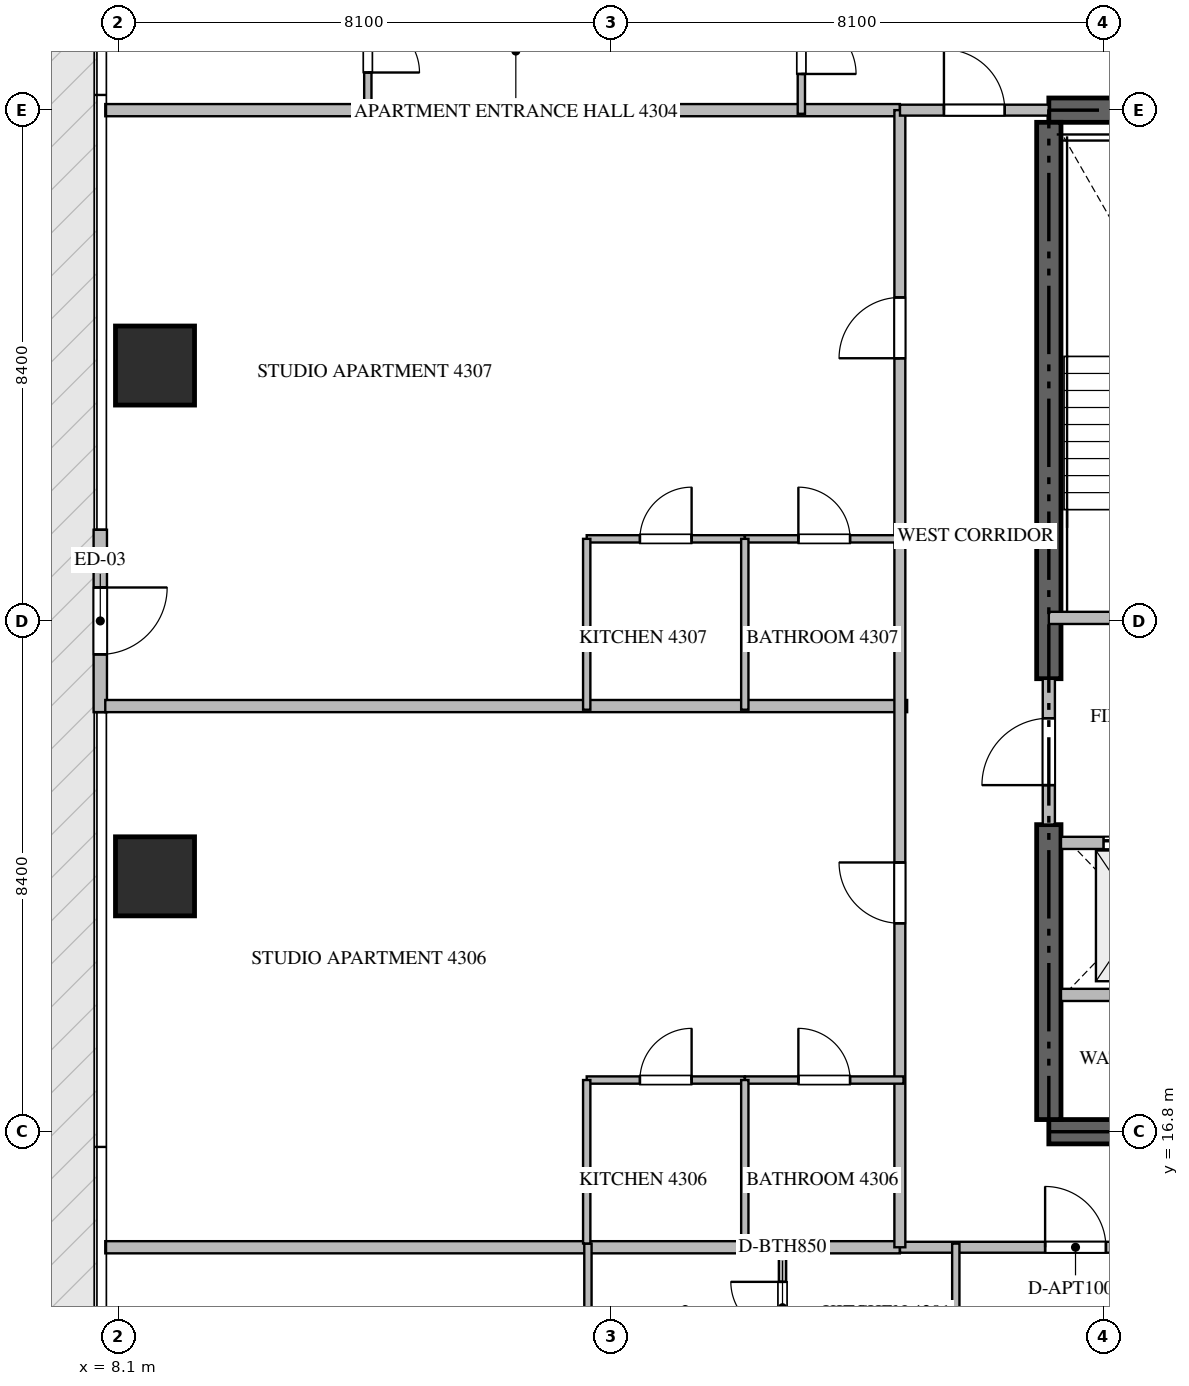
"""IFC4 building model, lengths in metres.
Left out: names, types, materials, properties, quantities, classifications, styles, units other than length and angle.
Written with IfcOpenShell. Run it as: python <this file> out.ifc"""

import sys

from ifc_helpers import new_model, si_unit, direction, frame, frame_2d, origin, origin_2d, place, context, subcontext, project, spatial, rectangle, extrude, source, transform, mapped, element, fill, save


model = new_model("IFC4")
c1 = context("Model", 3, precision=1e-05, world=origin(), true_north=direction((0.0, 1.0)))
c2 = subcontext(c1, "Body", "Model", "MODEL_VIEW")
j1 = project(units=[si_unit("LENGTHUNIT", "METRE"), si_unit("PLANEANGLEUNIT", "RADIAN")], contexts=[c1])
p1 = place(None, origin())
s1 = spatial("IfcSite", under=j1, at=p1, CompositionType="ELEMENT")
p2 = place(p1, origin())
s2 = spatial("IfcBuilding", under=s1, at=p2, CompositionType="ELEMENT")
p3 = place(p2, frame((0.0, 0.0, 172.65)))
s3 = spatial("IfcBuildingStorey", under=s2, at=p3, CompositionType="ELEMENT", Elevation=172.65)
for number, where, z_axis, x_axis in (
    (1, (23.4, 16.8, -0.26), (0.0, 0.0, 1.0), (1.0, 0.0, 0.0)),
    (2, (41.4, 33.6, -0.26), (0.0, 0.0, 1.0), (-1.0, 0.0, 0.0)),
):
    element("IfcWall", number, at=place(p3, frame(where, z_axis=z_axis, x_axis=x_axis)), inside=s3, PredefinedType="SHEAR", context=c2, shape_type="SweptSolid", body=[
        extrude(rectangle(XDim=18.0, YDim=0.4, at=frame_2d((9.0, 0.0))), origin(), (0.0, 0.0, 1.0), 3.748),
    ])
p4 = place(p3, frame((23.4, 17.0, -0.26), z_axis=(0.0, 0.0, 1.0), x_axis=(0.0, 1.0, 0.0)))
e3 = element("IfcWall", 3, at=p4, inside=s3, PredefinedType="SHEAR", context=c2, shape_type="SweptSolid", body=[
    extrude(rectangle(XDim=4.85, YDim=0.4, at=frame_2d((2.425, 0.0))), origin(), (0.0, 0.0, 1.0), 3.748),
])
p5 = place(p3, frame((23.4, 24.25, -0.26), z_axis=(0.0, 0.0, 1.0), x_axis=(0.0, 1.0, 0.0)))
e4 = element("IfcWall", 4, at=p5, inside=s3, PredefinedType="SHEAR", context=c2, shape_type="SweptSolid", body=[
    extrude(rectangle(XDim=9.15, YDim=0.4, at=frame_2d((4.575, 0.0))), origin(), (0.0, 0.0, 1.0), 3.748),
])
m1 = source(origin(), c2, "Body", "SweptSolid", [
    extrude(rectangle(XDim=1.3, YDim=1.3, at=origin_2d()), origin(), (0.0, 0.0, 1.0), 3.75),
])
for number, where, z_axis, x_axis in (
    (5, (8.7, 21.0, -0.26), (0.0, 0.0, 1.0), (1.0, 0.0, 0.0)),
    (6, (8.7, 29.4, -0.26), (0.0, 0.0, 1.0), (1.0, 0.0, 0.0)),
):
    element("IfcColumn", number, at=place(p3, frame(where, z_axis=z_axis, x_axis=x_axis)), inside=s3, PredefinedType="COLUMN", context=c2, shape_type="MappedRepresentation", body=[
        mapped(m1, transform((0.0, 0.0, 0.0), scale=1.0)),
    ])
p6 = place(p3, frame((7.8, 26.7, 0.0), z_axis=(0.0, 0.0, 1.0), x_axis=(0.0, -1.0, 0.0)))
e7 = element("IfcWall", 7, at=p6, inside=s3, PredefinedType="ELEMENTEDWALL", context=c2, shape_type="SweptSolid", body=[
    extrude(rectangle(XDim=3.0, YDim=0.22, at=frame_2d((1.5, 0.0))), origin(), (0.0, 0.0, 1.0), 3.475),
])
p7 = place(p6, frame((0.95, 0.0, 0.0)))
e8 = element("IfcOpeningElement", 8, at=p7, cuts=e7, PredefinedType="OPENING", context=c2, shape_type="SweptSolid", body=[
    extrude(rectangle(XDim=1.1, YDim=2.2, at=frame_2d((0.55, 1.1))), frame((0.0, 0.12, 0.0), z_axis=(0.0, -1.0, 0.0), x_axis=(1.0, 0.0, 0.0)), (0.0, 0.0, 1.0), 0.24),
])
p8 = place(p3, frame((23.4, 25.25, 0.0), z_axis=(0.0, 0.0, 1.0), x_axis=(1.0, 0.0, 0.0)))
e9 = element("IfcWall", 9, at=p8, inside=s3, PredefinedType="STANDARD", context=c2, shape_type="SweptSolid", body=[
    extrude(rectangle(XDim=4.45, YDim=0.2, at=frame_2d((2.225, 0.0))), origin(), (0.0, 0.0, 1.0), 3.49),
])
p9 = place(p8, frame((1.65, 0.0, 0.0)))
e10 = element("IfcOpeningElement", 10, at=p9, cuts=e9, PredefinedType="OPENING", context=c2, shape_type="SweptSolid", body=[
    extrude(rectangle(XDim=1.1, YDim=2.15, at=frame_2d((0.55, 1.075))), frame((0.0, 0.11, 0.0), z_axis=(0.0, -1.0, 0.0), x_axis=(1.0, 0.0, 0.0)), (0.0, 0.0, 1.0), 0.22),
])
p10 = place(p3, frame((23.6, 21.55, 0.0), z_axis=(0.0, 0.0, 1.0), x_axis=(1.0, 0.0, 0.0)))
e11 = element("IfcWall", 11, at=p10, inside=s3, PredefinedType="STANDARD", context=c2, shape_type="SweptSolid", body=[
    extrude(rectangle(XDim=2.45, YDim=0.2, at=frame_2d((1.225, 0.0))), origin(), (0.0, 0.0, 1.0), 3.49),
])
p11 = place(p10, frame((0.7, 0.0, 0.0)))
e12 = element("IfcOpeningElement", 12, at=p11, cuts=e11, PredefinedType="OPENING", context=c2, shape_type="SweptSolid", body=[
    extrude(rectangle(XDim=1.2, YDim=2.2, at=frame_2d((0.6, 1.1))), frame((0.0, 0.11, 0.0), z_axis=(0.0, -1.0, 0.0), x_axis=(1.0, 0.0, 0.0)), (0.0, 0.0, 1.0), 0.22),
])
p12 = place(p3, frame((23.6, 19.05, 0.0), z_axis=(0.0, 0.0, 1.0), x_axis=(1.0, 0.0, 0.0)))
e13 = element("IfcWall", 13, at=p12, inside=s3, PredefinedType="STANDARD", context=c2, shape_type="SweptSolid", body=[
    extrude(rectangle(XDim=2.45, YDim=0.2, at=frame_2d((1.225, 0.0))), origin(), (0.0, 0.0, 1.0), 3.49),
])
p13 = place(p3, frame((23.4, 21.852, 0.0), z_axis=(0.0, 0.0, 1.0), x_axis=(0.0, 1.0, 0.0)))
e14 = element("IfcWall", 14, at=p13, inside=s3, PredefinedType="STANDARD", context=c2, shape_type="SweptSolid", body=[
    extrude(rectangle(XDim=2.396, YDim=0.2, at=frame_2d((1.198, 0.0))), origin(), (0.0, 0.0, 1.0), 3.49),
])
p14 = place(p13, frame((0.648, 0.0, 0.0)))
e15 = element("IfcOpeningElement", 15, at=p14, cuts=e14, PredefinedType="OPENING", context=c2, shape_type="SweptSolid", body=[
    extrude(rectangle(XDim=1.1, YDim=2.15, at=frame_2d((0.55, 1.075))), frame((0.0, 0.11, 0.0), z_axis=(0.0, -1.0, 0.0), x_axis=(1.0, 0.0, 0.0)), (0.0, 0.0, 1.0), 0.22),
])
p15 = place(p3, frame((7.882, 23.8, 0.0), z_axis=(0.0, 0.0, 1.0), x_axis=(1.0, 0.0, 0.0)))
e16 = element("IfcWall", 16, at=p15, inside=s3, PredefinedType="PARTITIONING", context=c2, shape_type="SweptSolid", body=[
    extrude(rectangle(XDim=13.188, YDim=0.2, at=frame_2d((6.594, 0.0))), origin(), (0.0, 0.0, 1.0), 3.49),
])
for number, where, z_axis, x_axis in (
    (17, (7.882, 14.9, 0.0), (0.0, 0.0, 1.0), (1.0, 0.0, 0.0)),
    (18, (7.882, 33.6, 0.0), (0.0, 0.0, 1.0), (1.0, 0.0, 0.0)),
):
    element("IfcWall", number, at=place(p3, frame(where, z_axis=z_axis, x_axis=x_axis)), inside=s3, PredefinedType="PARTITIONING", context=c2, shape_type="SweptSolid", body=[
        extrude(rectangle(XDim=13.068, YDim=0.2, at=frame_2d((6.534, 0.0))), origin(), (0.0, 0.0, 1.0), 3.49),
    ])
p16 = place(p3, frame((20.952, 14.9, 0.0), z_axis=(0.0, 0.0, 1.0), x_axis=(1.0, 0.0, 0.0)))
e19 = element("IfcWall", 19, at=p16, inside=s3, PredefinedType="PARTITIONING", context=c2, shape_type="SweptSolid", body=[
    extrude(rectangle(XDim=22.896, YDim=0.18, at=frame_2d((11.448, 0.0))), origin(), (0.0, 0.0, 1.0), 3.49),
])
p17 = place(p16, frame((2.387, 0.0, 0.0)))
e20 = element("IfcOpeningElement", 20, at=p17, cuts=e19, PredefinedType="OPENING", context=c2, shape_type="SweptSolid", body=[
    extrude(rectangle(XDim=1.0, YDim=2.15, at=frame_2d((0.5, 1.075))), frame((0.0, 0.1, 0.0), z_axis=(0.0, -1.0, 0.0), x_axis=(1.0, 0.0, 0.0)), (0.0, 0.0, 1.0), 0.2),
])
p18 = place(p16, frame((6.591, 0.0, 0.0)))
e21 = element("IfcOpeningElement", 21, at=p18, cuts=e19, PredefinedType="OPENING", context=c2, shape_type="SweptSolid", body=[
    extrude(rectangle(XDim=1.0, YDim=2.15, at=frame_2d((0.5, 1.075))), frame((0.0, 0.1, 0.0), z_axis=(0.0, -1.0, 0.0), x_axis=(1.0, 0.0, 0.0)), (0.0, 0.0, 1.0), 0.2),
])
p19 = place(p16, frame((16.51, 0.0, 0.0)))
e22 = element("IfcOpeningElement", 22, at=p19, cuts=e19, PredefinedType="OPENING", context=c2, shape_type="SweptSolid", body=[
    extrude(rectangle(XDim=1.0, YDim=2.15, at=frame_2d((0.5, 1.075))), frame((0.0, 0.1, 0.0), z_axis=(0.0, -1.0, 0.0), x_axis=(1.0, 0.0, 0.0)), (0.0, 0.0, 1.0), 0.2),
])
p20 = place(p3, frame((20.95, 14.9, 0.0), z_axis=(0.0, 0.0, 1.0), x_axis=(0.0, 1.0, 0.0)))
e23 = element("IfcWall", 23, at=p20, inside=s3, PredefinedType="PARTITIONING", context=c2, shape_type="SweptSolid", body=[
    extrude(rectangle(XDim=18.7, YDim=0.18, at=frame_2d((9.35, 0.0))), origin(), (0.0, 0.0, 1.0), 3.49),
])
p21 = place(p20, frame((5.328, 0.0, 0.0)))
e24 = element("IfcOpeningElement", 24, at=p21, cuts=e23, PredefinedType="OPENING", context=c2, shape_type="SweptSolid", body=[
    extrude(rectangle(XDim=1.0, YDim=2.15, at=frame_2d((0.5, 1.075))), frame((0.0, 0.1, 0.0), z_axis=(0.0, -1.0, 0.0), x_axis=(1.0, 0.0, 0.0)), (0.0, 0.0, 1.0), 0.2),
])
p22 = place(p20, frame((14.62, 0.0, 0.0)))
e25 = element("IfcOpeningElement", 25, at=p22, cuts=e23, PredefinedType="OPENING", context=c2, shape_type="SweptSolid", body=[
    extrude(rectangle(XDim=1.0, YDim=2.15, at=frame_2d((0.5, 1.075))), frame((0.0, 0.1, 0.0), z_axis=(0.0, -1.0, 0.0), x_axis=(1.0, 0.0, 0.0)), (0.0, 0.0, 1.0), 0.2),
])
p23 = place(p3, frame((20.952, 33.6, 0.0), z_axis=(0.0, 0.0, 1.0), x_axis=(1.0, 0.0, 0.0)))
e26 = element("IfcWall", 26, at=p23, inside=s3, PredefinedType="PARTITIONING", context=c2, shape_type="SweptSolid", body=[
    extrude(rectangle(XDim=2.446, YDim=0.18, at=frame_2d((1.223, 0.0))), origin(), (0.0, 0.0, 1.0), 3.49),
])
p24 = place(p23, frame((0.723, 0.0, 0.0)))
e27 = element("IfcOpeningElement", 27, at=p24, cuts=e26, PredefinedType="OPENING", context=c2, shape_type="SweptSolid", body=[
    extrude(rectangle(XDim=1.0, YDim=2.15, at=frame_2d((0.5, 1.075))), frame((0.0, 0.1, 0.0), z_axis=(0.0, -1.0, 0.0), x_axis=(1.0, 0.0, 0.0)), (0.0, 0.0, 1.0), 0.2),
])
p25 = place(p3, frame((21.87, 12.15, 0.0), z_axis=(0.0, 0.0, 1.0), x_axis=(0.0, 1.0, 0.0)))
e28 = element("IfcWall", 28, at=p25, inside=s3, PredefinedType="PARTITIONING", context=c2, shape_type="SweptSolid", body=[
    extrude(rectangle(XDim=2.81, YDim=0.12, at=frame_2d((1.405, 0.0))), origin(), (0.0, 0.0, 1.0), 3.49),
])
p26 = place(p3, frame((15.82, 12.85, 0.0), z_axis=(0.0, 0.0, 1.0), x_axis=(0.0, 1.0, 0.0)))
e29 = element("IfcWall", 29, at=p26, inside=s3, PredefinedType="PARTITIONING", context=c2, shape_type="SweptSolid", body=[
    extrude(rectangle(XDim=2.11, YDim=0.12, at=frame_2d((1.055, 0.0))), origin(), (0.0, 0.0, 1.0), 3.49),
])
p27 = place(p3, frame((19.02, 12.852, 0.0), z_axis=(0.0, 0.0, 1.0), x_axis=(0.0, 1.0, 0.0)))
e30 = element("IfcWall", 30, at=p27, inside=s3, PredefinedType="PARTITIONING", context=c2, shape_type="SweptSolid", body=[
    extrude(rectangle(XDim=2.108, YDim=0.12, at=frame_2d((1.054, 0.0))), origin(), (0.0, 0.0, 1.0), 3.49),
])
p28 = place(p27, frame((0.629, 0.0, 0.0)))
e31 = element("IfcOpeningElement", 31, at=p28, cuts=e30, PredefinedType="OPENING", context=c2, shape_type="SweptSolid", body=[
    extrude(rectangle(XDim=0.85, YDim=2.1, at=frame_2d((0.425, 1.05))), frame((0.0, 0.07, 0.0), z_axis=(0.0, -1.0, 0.0), x_axis=(1.0, 0.0, 0.0)), (0.0, 0.0, 1.0), 0.14),
])
p29 = place(p3, frame((19.33, 35.75, 0.0), z_axis=(0.0, 0.0, 1.0), x_axis=(0.0, -1.0, 0.0)))
e32 = element("IfcWall", 32, at=p29, inside=s3, PredefinedType="PARTITIONING", context=c2, shape_type="SweptSolid", body=[
    extrude(rectangle(XDim=2.21, YDim=0.12, at=frame_2d((1.105, 0.0))), origin(), (0.0, 0.0, 1.0), 3.49),
])
p30 = place(p29, frame((0.655, 0.0, 0.0)))
e33 = element("IfcOpeningElement", 33, at=p30, cuts=e32, PredefinedType="OPENING", context=c2, shape_type="SweptSolid", body=[
    extrude(rectangle(XDim=0.9, YDim=2.1, at=frame_2d((0.45, 1.05))), frame((0.0, 0.07, 0.0), z_axis=(0.0, -1.0, 0.0), x_axis=(1.0, 0.0, 0.0)), (0.0, 0.0, 1.0), 0.14),
])
p31 = place(p3, frame((12.2, 35.748, 0.0), z_axis=(0.0, 0.0, 1.0), x_axis=(0.0, -1.0, 0.0)))
e34 = element("IfcWall", 34, at=p31, inside=s3, PredefinedType="PARTITIONING", context=c2, shape_type="SweptSolid", body=[
    extrude(rectangle(XDim=2.208, YDim=0.12, at=frame_2d((1.104, 0.0))), origin(), (0.0, 0.0, 1.0), 3.49),
])
p32 = place(p31, frame((0.679, 0.0, 0.0)))
e35 = element("IfcOpeningElement", 35, at=p32, cuts=e34, PredefinedType="OPENING", context=c2, shape_type="SweptSolid", body=[
    extrude(rectangle(XDim=0.85, YDim=2.1, at=frame_2d((0.425, 1.05))), frame((0.0, 0.07, 0.0), z_axis=(0.0, -1.0, 0.0), x_axis=(1.0, 0.0, 0.0)), (0.0, 0.0, 1.0), 0.14),
])
p33 = place(p3, frame((15.8, 17.65, 0.0), z_axis=(0.0, 0.0, 1.0), x_axis=(1.0, 0.0, 0.0)))
e36 = element("IfcWall", 36, at=p33, inside=s3, PredefinedType="PARTITIONING", context=c2, shape_type="SweptSolid", body=[
    extrude(rectangle(XDim=2.6, YDim=0.12, at=frame_2d((1.3, 0.0))), origin(), (0.0, 0.0, 1.0), 3.49),
])
p34 = place(p33, frame((0.875, 0.0, 0.0)))
e37 = element("IfcOpeningElement", 37, at=p34, cuts=e36, PredefinedType="OPENING", context=c2, shape_type="SweptSolid", body=[
    extrude(rectangle(XDim=0.85, YDim=2.1, at=frame_2d((0.425, 1.05))), frame((0.0, 0.07, 0.0), z_axis=(0.0, -1.0, 0.0), x_axis=(1.0, 0.0, 0.0)), (0.0, 0.0, 1.0), 0.14),
])
p35 = place(p3, frame((18.402, 17.65, 0.0), z_axis=(0.0, 0.0, 1.0), x_axis=(1.0, 0.0, 0.0)))
e38 = element("IfcWall", 38, at=p35, inside=s3, PredefinedType="PARTITIONING", context=c2, shape_type="SweptSolid", body=[
    extrude(rectangle(XDim=2.608, YDim=0.12, at=frame_2d((1.304, 0.0))), origin(), (0.0, 0.0, 1.0), 3.49),
])
p36 = place(p35, frame((0.879, 0.0, 0.0)))
e39 = element("IfcOpeningElement", 39, at=p36, cuts=e38, PredefinedType="OPENING", context=c2, shape_type="SweptSolid", body=[
    extrude(rectangle(XDim=0.85, YDim=2.1, at=frame_2d((0.425, 1.05))), frame((0.0, 0.07, 0.0), z_axis=(0.0, -1.0, 0.0), x_axis=(1.0, 0.0, 0.0)), (0.0, 0.0, 1.0), 0.14),
])
p37 = place(p3, frame((18.4, 14.84, 0.0), z_axis=(0.0, 0.0, 1.0), x_axis=(0.0, 1.0, 0.0)))
e40 = element("IfcWall", 40, at=p37, inside=s3, PredefinedType="PARTITIONING", context=c2, shape_type="SweptSolid", body=[
    extrude(rectangle(XDim=2.81, YDim=0.12, at=frame_2d((1.405, 0.0))), origin(), (0.0, 0.0, 1.0), 3.49),
])
p38 = place(p3, frame((15.8, 14.962, 0.0), z_axis=(0.0, 0.0, 1.0), x_axis=(0.0, 1.0, 0.0)))
e41 = element("IfcWall", 41, at=p38, inside=s3, PredefinedType="PARTITIONING", context=c2, shape_type="SweptSolid", body=[
    extrude(rectangle(XDim=2.688, YDim=0.12, at=frame_2d((1.344, 0.0))), origin(), (0.0, 0.0, 1.0), 3.49),
])
p39 = place(p3, frame((15.8, 26.55, 0.0), z_axis=(0.0, 0.0, 1.0), x_axis=(1.0, 0.0, 0.0)))
e42 = element("IfcWall", 42, at=p39, inside=s3, PredefinedType="PARTITIONING", context=c2, shape_type="SweptSolid", body=[
    extrude(rectangle(XDim=2.6, YDim=0.12, at=frame_2d((1.3, 0.0))), origin(), (0.0, 0.0, 1.0), 3.49),
])
p40 = place(p39, frame((0.875, 0.0, 0.0)))
e43 = element("IfcOpeningElement", 43, at=p40, cuts=e42, PredefinedType="OPENING", context=c2, shape_type="SweptSolid", body=[
    extrude(rectangle(XDim=0.85, YDim=2.1, at=frame_2d((0.425, 1.05))), frame((0.0, 0.07, 0.0), z_axis=(0.0, -1.0, 0.0), x_axis=(1.0, 0.0, 0.0)), (0.0, 0.0, 1.0), 0.14),
])
p41 = place(p3, frame((18.402, 26.55, 0.0), z_axis=(0.0, 0.0, 1.0), x_axis=(1.0, 0.0, 0.0)))
e44 = element("IfcWall", 44, at=p41, inside=s3, PredefinedType="PARTITIONING", context=c2, shape_type="SweptSolid", body=[
    extrude(rectangle(XDim=2.608, YDim=0.12, at=frame_2d((1.304, 0.0))), origin(), (0.0, 0.0, 1.0), 3.49),
])
p42 = place(p41, frame((0.879, 0.0, 0.0)))
e45 = element("IfcOpeningElement", 45, at=p42, cuts=e44, PredefinedType="OPENING", context=c2, shape_type="SweptSolid", body=[
    extrude(rectangle(XDim=0.85, YDim=2.1, at=frame_2d((0.425, 1.05))), frame((0.0, 0.07, 0.0), z_axis=(0.0, -1.0, 0.0), x_axis=(1.0, 0.0, 0.0)), (0.0, 0.0, 1.0), 0.14),
])
for number, where, z_axis, x_axis in (
    (46, (18.4, 23.74, 0.0), (0.0, 0.0, 1.0), (0.0, 1.0, 0.0)),
    (47, (15.8, 23.74, 0.0), (0.0, 0.0, 1.0), (0.0, 1.0, 0.0)),
):
    element("IfcWall", number, at=place(p3, frame(where, z_axis=z_axis, x_axis=x_axis)), inside=s3, PredefinedType="PARTITIONING", context=c2, shape_type="SweptSolid", body=[
        extrude(rectangle(XDim=2.81, YDim=0.12, at=frame_2d((1.405, 0.0))), origin(), (0.0, 0.0, 1.0), 3.49),
    ])
m2 = source(origin(), c2, "Body", "SweptSolid", [
    extrude(rectangle(XDim=1.1, YDim=2.2, at=frame_2d((0.55, 1.1))), frame((0.0, 0.025, 0.0), z_axis=(0.0, -1.0, 0.0), x_axis=(1.0, 0.0, 0.0)), (0.0, 0.0, 1.0), 0.05),
])
p43 = place(p7, origin())
e48 = element("IfcDoor", 48, at=p43, inside=s3, OperationType="SINGLE_SWING_LEFT", PredefinedType="DOOR", context=c2, shape_type="MappedRepresentation", body=[
    mapped(m2, transform((0.0, 0.0, 0.0), scale=1.0)),
])
fill(e8, e48)
m3 = source(origin(), c2, "Body", "SweptSolid", [
    extrude(rectangle(XDim=1.2, YDim=2.2, at=frame_2d((0.6, 1.1))), frame((0.0, 0.025, 0.0), z_axis=(0.0, -1.0, 0.0), x_axis=(1.0, 0.0, 0.0)), (0.0, 0.0, 1.0), 0.05),
])
p44 = place(p11, origin())
e49 = element("IfcDoor", 49, at=p44, inside=s3, OperationType="DOUBLE_DOOR_SLIDING", PredefinedType="DOOR", context=c2, shape_type="MappedRepresentation", body=[
    mapped(m3, transform((0.0, 0.0, 0.0), scale=1.0)),
])
fill(e12, e49)
m4 = source(origin(), c2, "Body", "SweptSolid", [
    extrude(rectangle(XDim=1.1, YDim=2.15, at=frame_2d((0.55, 1.075))), frame((0.0, 0.025, 0.0), z_axis=(0.0, -1.0, 0.0), x_axis=(1.0, 0.0, 0.0)), (0.0, 0.0, 1.0), 0.05),
])
p45 = place(p14, origin())
e50 = element("IfcDoor", 50, at=p45, inside=s3, OperationType="SINGLE_SWING_LEFT", PredefinedType="DOOR", context=c2, shape_type="MappedRepresentation", body=[
    mapped(m4, transform((0.0, 0.0, 0.0), scale=1.0)),
])
fill(e15, e50)
m5 = source(origin(), c2, "Body", "SweptSolid", [
    extrude(rectangle(XDim=1.0, YDim=2.15, at=frame_2d((0.5, 1.075))), frame((0.0, 0.025, 0.0), z_axis=(0.0, -1.0, 0.0), x_axis=(1.0, 0.0, 0.0)), (0.0, 0.0, 1.0), 0.05),
])
p46 = place(p17, origin())
e51 = element("IfcDoor", 51, at=p46, inside=s3, OperationType="SINGLE_SWING_LEFT", PredefinedType="DOOR", context=c2, shape_type="MappedRepresentation", body=[
    mapped(m5, transform((0.0, 0.0, 0.0), scale=1.0)),
])
fill(e20, e51)
p47 = place(p21, origin())
e52 = element("IfcDoor", 52, at=p47, inside=s3, OperationType="SINGLE_SWING_RIGHT", PredefinedType="DOOR", context=c2, shape_type="MappedRepresentation", body=[
    mapped(m5, transform((0.0, 0.0, 0.0), scale=1.0)),
])
fill(e24, e52)
p48 = place(p22, origin())
e53 = element("IfcDoor", 53, at=p48, inside=s3, OperationType="SINGLE_SWING_LEFT", PredefinedType="DOOR", context=c2, shape_type="MappedRepresentation", body=[
    mapped(m5, transform((0.0, 0.0, 0.0), scale=1.0)),
])
fill(e25, e53)
p49 = place(p24, origin())
e54 = element("IfcDoor", 54, at=p49, inside=s3, OperationType="SINGLE_SWING_LEFT", PredefinedType="DOOR", context=c2, shape_type="MappedRepresentation", body=[
    mapped(m5, transform((0.0, 0.0, 0.0), scale=1.0)),
])
fill(e27, e54)
m6 = source(origin(), c2, "Body", "SweptSolid", [
    extrude(rectangle(XDim=0.85, YDim=2.1, at=frame_2d((0.425, 1.05))), frame((0.0, 0.025, 0.0), z_axis=(0.0, -1.0, 0.0), x_axis=(1.0, 0.0, 0.0)), (0.0, 0.0, 1.0), 0.05),
])
p50 = place(p28, origin())
e55 = element("IfcDoor", 55, at=p50, inside=s3, OperationType="SINGLE_SWING_RIGHT", PredefinedType="DOOR", context=c2, shape_type="MappedRepresentation", body=[
    mapped(m6, transform((0.0, 0.0, 0.0), scale=1.0)),
])
fill(e31, e55)
m7 = source(origin(), c2, "Body", "SweptSolid", [
    extrude(rectangle(XDim=0.9, YDim=2.1, at=frame_2d((0.45, 1.05))), frame((0.0, 0.025, 0.0), z_axis=(0.0, -1.0, 0.0), x_axis=(1.0, 0.0, 0.0)), (0.0, 0.0, 1.0), 0.05),
])
p51 = place(p30, origin())
e56 = element("IfcDoor", 56, at=p51, inside=s3, OperationType="SINGLE_SWING_RIGHT", PredefinedType="DOOR", context=c2, shape_type="MappedRepresentation", body=[
    mapped(m7, transform((0.0, 0.0, 0.0), scale=1.0)),
])
fill(e33, e56)
p52 = place(p32, origin())
e57 = element("IfcDoor", 57, at=p52, inside=s3, OperationType="SINGLE_SWING_RIGHT", PredefinedType="DOOR", context=c2, shape_type="MappedRepresentation", body=[
    mapped(m6, transform((0.0, 0.0, 0.0), scale=1.0)),
])
fill(e35, e57)
p53 = place(p34, origin())
e58 = element("IfcDoor", 58, at=p53, inside=s3, OperationType="SINGLE_SWING_RIGHT", PredefinedType="DOOR", context=c2, shape_type="MappedRepresentation", body=[
    mapped(m6, transform((0.0, 0.0, 0.0), scale=1.0)),
])
fill(e37, e58)
p54 = place(p36, origin())
e59 = element("IfcDoor", 59, at=p54, inside=s3, OperationType="SINGLE_SWING_LEFT", PredefinedType="DOOR", context=c2, shape_type="MappedRepresentation", body=[
    mapped(m6, transform((0.0, 0.0, 0.0), scale=1.0)),
])
fill(e39, e59)
p55 = place(p40, origin())
e60 = element("IfcDoor", 60, at=p55, inside=s3, OperationType="SINGLE_SWING_RIGHT", PredefinedType="DOOR", context=c2, shape_type="MappedRepresentation", body=[
    mapped(m6, transform((0.0, 0.0, 0.0), scale=1.0)),
])
fill(e43, e60)
p56 = place(p42, origin())
e61 = element("IfcDoor", 61, at=p56, inside=s3, OperationType="SINGLE_SWING_LEFT", PredefinedType="DOOR", context=c2, shape_type="MappedRepresentation", body=[
    mapped(m6, transform((0.0, 0.0, 0.0), scale=1.0)),
])
fill(e45, e61)
save(model, sys.argv[1])
